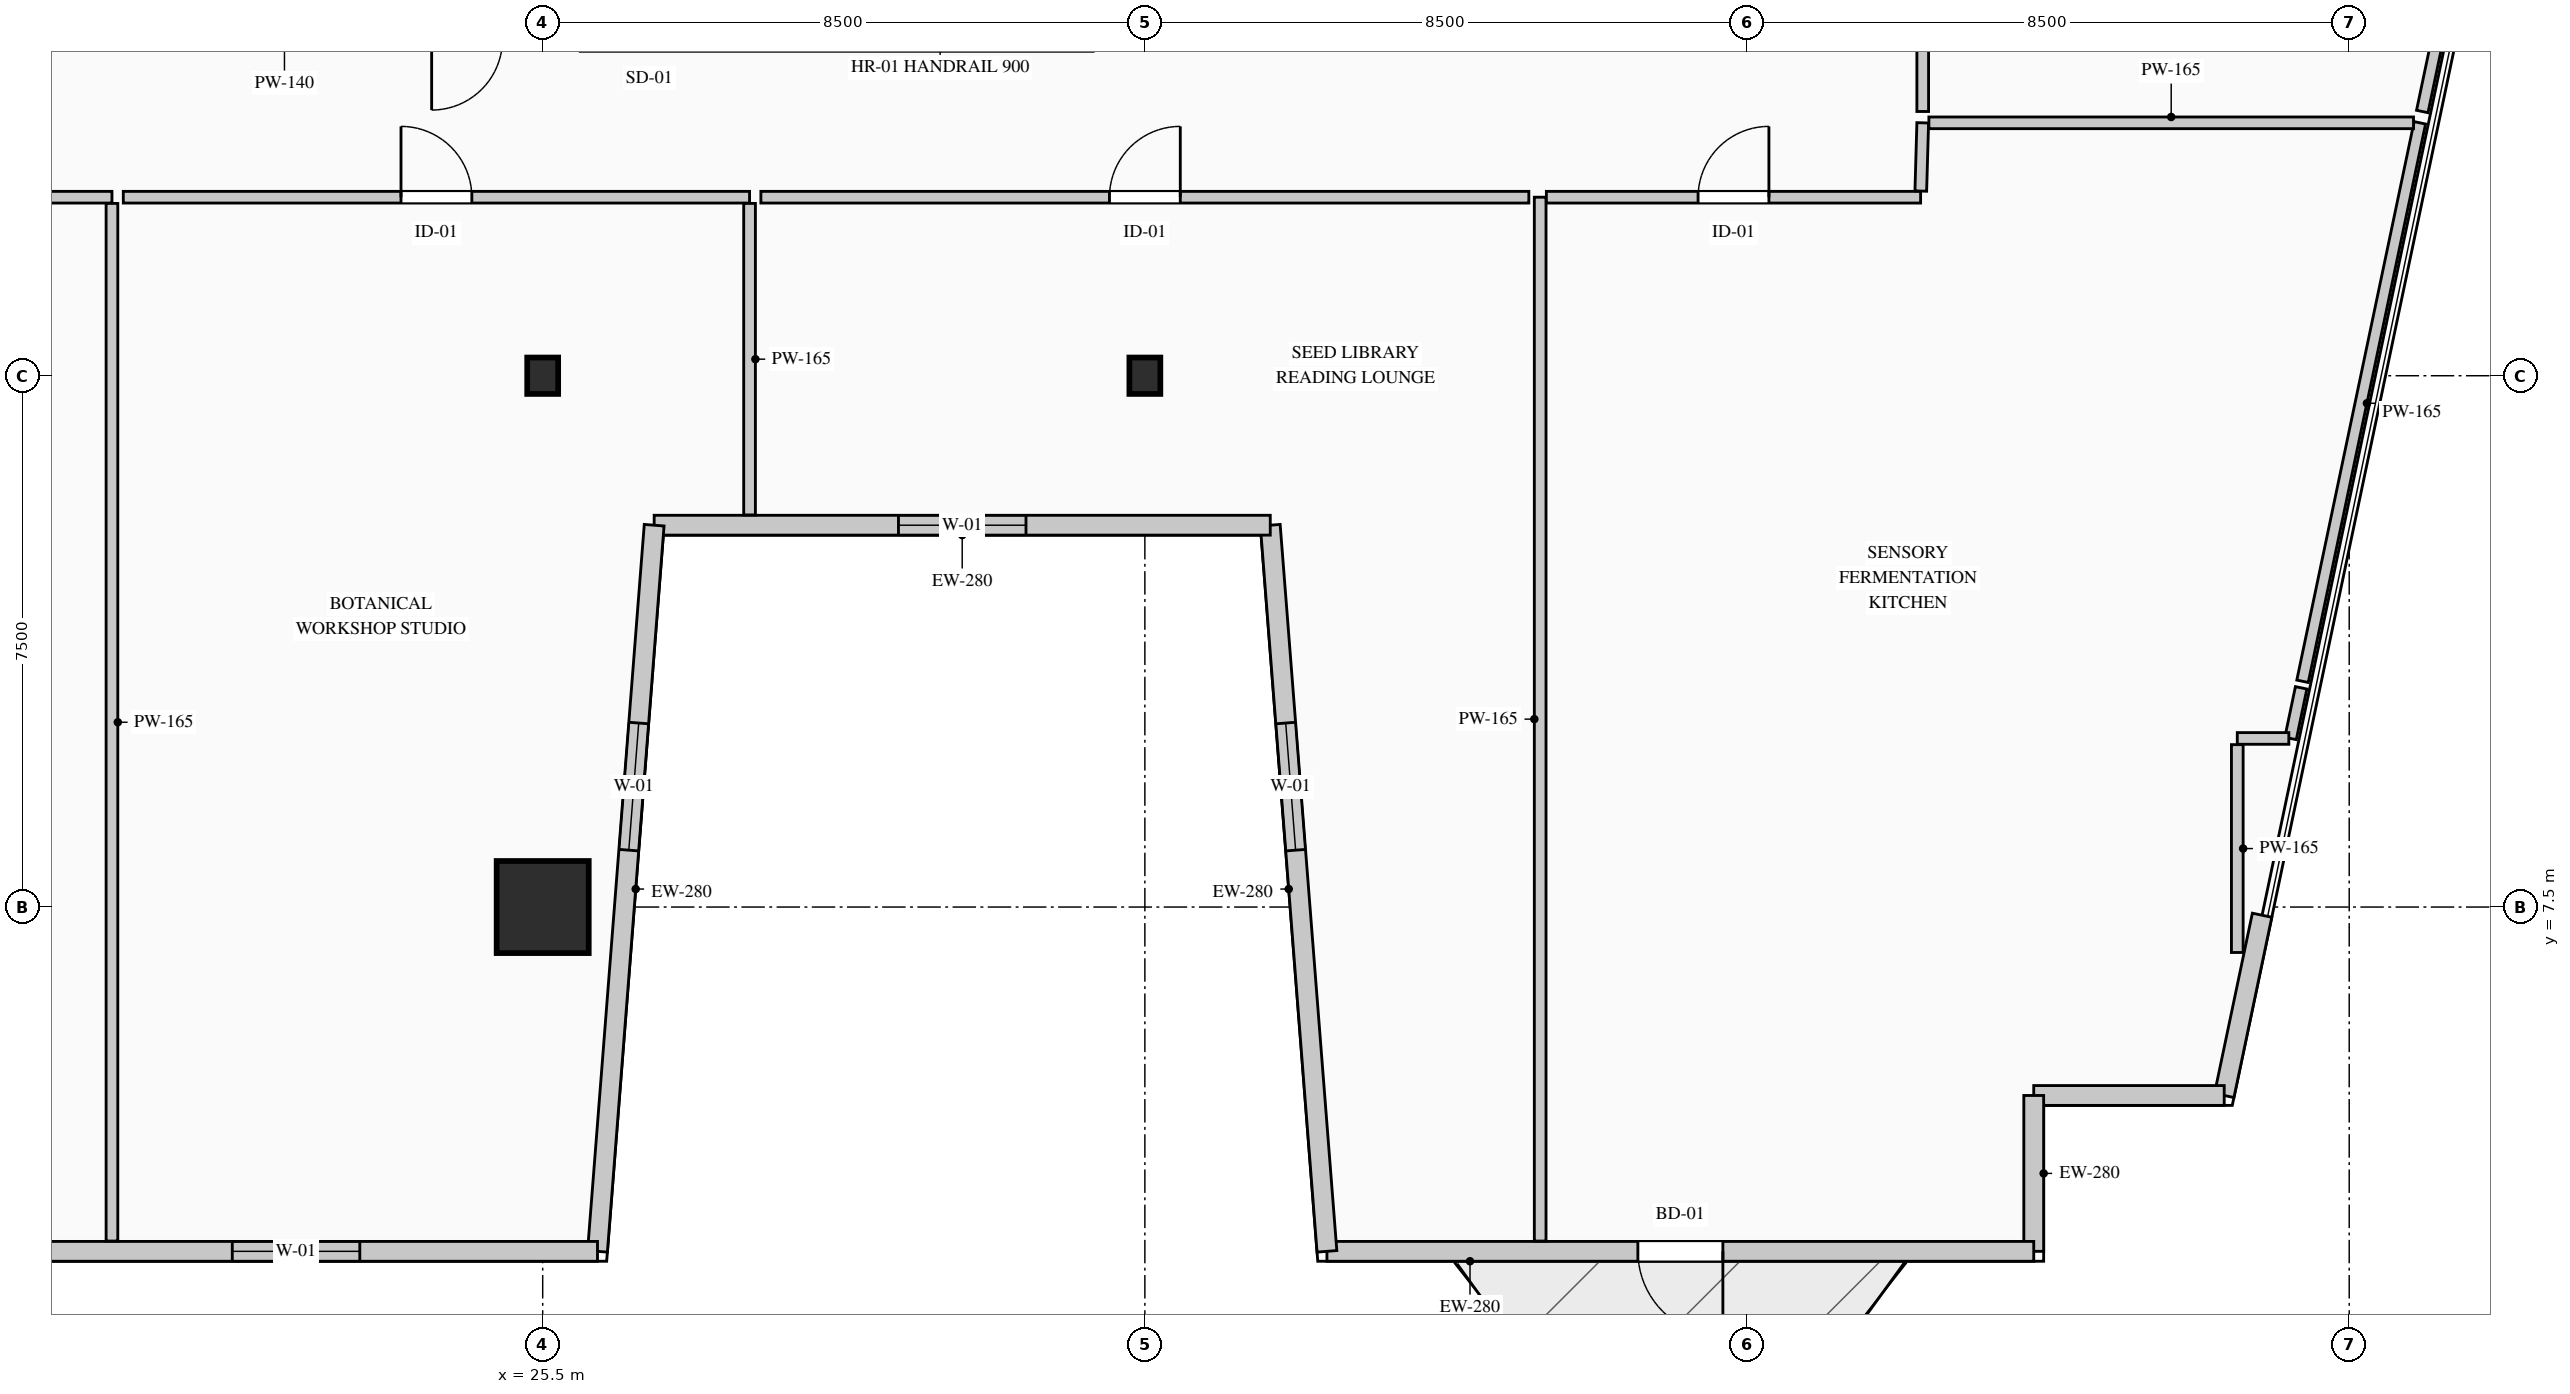
"""IFC4 building model, lengths in metres.
Left out: names, types, materials, properties, quantities, classifications, styles, units other than length and angle.
Written with IfcOpenShell. Run it as: python <this file> out.ifc"""

import sys

from ifc_helpers import new_model, si_unit, direction, frame, frame_2d, origin, origin_2d, place, context, subcontext, project, spatial, rectangle, i_section, extrude, element, fill, save


model = new_model("IFC4")
c1 = context("Model", 3, precision=1e-05, world=origin(), true_north=direction((0.0, 1.0)))
c2 = subcontext(c1, "Body", "Model", "MODEL_VIEW")
j1 = project(units=[si_unit("LENGTHUNIT", "METRE"), si_unit("PLANEANGLEUNIT", "RADIAN")], contexts=[c1])
p1 = place(None, origin())
s1 = spatial("IfcSite", under=j1, at=p1, CompositionType="ELEMENT")
p2 = place(p1, origin())
s2 = spatial("IfcBuilding", under=s1, at=p2, CompositionType="ELEMENT")
p3 = place(p2, frame((0.0, 0.0, 88.6)))
s3 = spatial("IfcBuildingStorey", under=s2, at=p3, CompositionType="ELEMENT", Elevation=88.6)
p4 = place(p3, frame((25.5, 7.5, 0.0), z_axis=(0.0, 0.0, 1.0), x_axis=(1.0, 0.0, 0.0)))
e1 = element("IfcColumn", 1, at=p4, inside=s3, PredefinedType="COLUMN", context=c2, shape_type="SweptSolid", body=[
    extrude(rectangle(XDim=1.3, YDim=1.3, at=origin_2d()), origin(), (0.0, 0.0, 1.0), 4.4),
])
for number, where, z_axis, x_axis in (
    (2, (25.5, 15.0, 0.0), (0.0, 0.0, 1.0), (1.0, 0.0, 0.0)),
    (3, (34.0, 15.0, 0.0), (0.0, 0.0, 1.0), (1.0, 0.0, 0.0)),
):
    element("IfcColumn", number, at=place(p3, frame(where, z_axis=z_axis, x_axis=x_axis)), inside=s3, PredefinedType="COLUMN", context=c2, shape_type="SweptSolid", body=[
        extrude(i_section(OverallWidth=0.437, OverallDepth=0.514, WebThickness=0.061, FlangeThickness=0.077, FilletRadius=0.015, at=origin_2d()), origin(), (0.0, 0.0, 1.0), 4.4),
    ])
p5 = place(p3, frame((49.77, 7.385, 0.0), z_axis=(0.0, 0.0, 1.0), x_axis=(-0.205551409765, -0.978646319128, 0.0)))
e4 = element("IfcWall", 4, at=p5, inside=s3, PredefinedType="STANDARD", context=c2, shape_type="SweptSolid", body=[
    extrude(rectangle(XDim=2.6, YDim=0.28, at=frame_2d((1.3, 0.0))), origin(), (0.0, 0.0, 1.0), 4.115),
])
p6 = place(p3, frame((49.236, 4.84, 0.0), z_axis=(0.0, 0.0, 1.0), x_axis=(-1.0, 0.0, 0.0)))
e5 = element("IfcWall", 5, at=p6, inside=s3, PredefinedType="STANDARD", context=c2, shape_type="SweptSolid", body=[
    extrude(rectangle(XDim=2.688, YDim=0.28, at=frame_2d((1.344, 0.0))), origin(), (0.0, 0.0, 1.0), 4.115),
])
p7 = place(p3, frame((46.547, 4.84, 0.0), z_axis=(0.0, 0.0, 1.0), x_axis=(0.0, -1.0, 0.0)))
e6 = element("IfcWall", 6, at=p7, inside=s3, PredefinedType="STANDARD", context=c2, shape_type="SweptSolid", body=[
    extrude(rectangle(XDim=2.2, YDim=0.28, at=frame_2d((1.1, 0.0))), origin(), (0.0, 0.0, 1.0), 4.115),
])
p8 = place(p3, frame((46.547, 2.64, 0.0), z_axis=(0.0, 0.0, 1.0), x_axis=(-1.0, 0.0, 0.0)))
e7 = element("IfcWall", 7, at=p8, inside=s3, PredefinedType="STANDARD", context=c2, shape_type="SweptSolid", body=[
    extrude(rectangle(XDim=9.977, YDim=0.28, at=frame_2d((4.989, 0.0))), origin(), (0.0, 0.0, 1.0), 4.115),
])
p9 = place(p8, frame((4.388, 0.0, 0.0)))
e8 = element("IfcOpeningElement", 8, at=p9, cuts=e7, PredefinedType="OPENING", context=c2, shape_type="SweptSolid", body=[
    extrude(rectangle(XDim=1.2, YDim=2.2, at=frame_2d((0.6, 1.1))), frame((0.0, 0.15, 0.0), z_axis=(0.0, -1.0, 0.0), x_axis=(1.0, 0.0, 0.0)), (0.0, 0.0, 1.0), 0.3),
])
p10 = place(p3, frame((36.57, 2.64, 0.0), z_axis=(0.0, 0.0, 1.0), x_axis=(-0.077816860153, 0.996967670627, 0.0)))
e9 = element("IfcWall", 9, at=p10, inside=s3, PredefinedType="STANDARD", context=c2, shape_type="SweptSolid", body=[
    extrude(rectangle(XDim=10.281, YDim=0.28, at=frame_2d((5.141, 0.0))), origin(), (0.0, 0.0, 1.0), 4.115),
])
p11 = place(p10, frame((5.68, 0.0, 0.9)))
e10 = element("IfcOpeningElement", 10, at=p11, cuts=e9, PredefinedType="OPENING", context=c2, shape_type="SweptSolid", body=[
    extrude(rectangle(XDim=1.8, YDim=2.1, at=frame_2d((0.9, 1.05))), frame((0.0, 0.15, 0.0), z_axis=(0.0, -1.0, 0.0), x_axis=(1.0, 0.0, 0.0)), (0.0, 0.0, 1.0), 0.3),
])
p12 = place(p3, frame((35.77, 12.89, 0.0), z_axis=(0.0, 0.0, 1.0), x_axis=(-1.0, 0.0, 0.0)))
e11 = element("IfcWall", 11, at=p12, inside=s3, PredefinedType="STANDARD", context=c2, shape_type="SweptSolid", body=[
    extrude(rectangle(XDim=8.697, YDim=0.28, at=frame_2d((4.348, 0.0))), origin(), (0.0, 0.0, 1.0), 4.115),
])
p13 = place(p12, frame((3.448, 0.0, 0.9)))
e12 = element("IfcOpeningElement", 12, at=p13, cuts=e11, PredefinedType="OPENING", context=c2, shape_type="SweptSolid", body=[
    extrude(rectangle(XDim=1.8, YDim=2.1, at=frame_2d((0.9, 1.05))), frame((0.0, 0.15, 0.0), z_axis=(0.0, -1.0, 0.0), x_axis=(1.0, 0.0, 0.0)), (0.0, 0.0, 1.0), 0.3),
])
p14 = place(p3, frame((27.073, 12.89, 0.0), z_axis=(0.0, 0.0, 1.0), x_axis=(-0.077816860153, -0.996967670627, 0.0)))
e13 = element("IfcWall", 13, at=p14, inside=s3, PredefinedType="STANDARD", context=c2, shape_type="SweptSolid", body=[
    extrude(rectangle(XDim=10.281, YDim=0.28, at=frame_2d((5.141, 0.0))), origin(), (0.0, 0.0, 1.0), 4.115),
])
p15 = place(p14, frame((2.801, 0.0, 0.9)))
e14 = element("IfcOpeningElement", 14, at=p15, cuts=e13, PredefinedType="OPENING", context=c2, shape_type="SweptSolid", body=[
    extrude(rectangle(XDim=1.8, YDim=2.1, at=frame_2d((0.9, 1.05))), frame((0.0, 0.15, 0.0), z_axis=(0.0, -1.0, 0.0), x_axis=(1.0, 0.0, 0.0)), (0.0, 0.0, 1.0), 0.3),
])
p16 = place(p3, frame((26.273, 2.64, 0.0), z_axis=(0.0, 0.0, 1.0), x_axis=(-1.0, 0.0, 0.0)))
e15 = element("IfcWall", 15, at=p16, inside=s3, PredefinedType="STANDARD", context=c2, shape_type="SweptSolid", body=[
    extrude(rectangle(XDim=15.197, YDim=0.28, at=frame_2d((7.598, 0.0))), origin(), (0.0, 0.0, 1.0), 4.115),
])
p17 = place(p16, frame((3.355, 0.0, 0.9)))
e16 = element("IfcOpeningElement", 16, at=p17, cuts=e15, PredefinedType="OPENING", context=c2, shape_type="SweptSolid", body=[
    extrude(rectangle(XDim=1.8, YDim=2.1, at=frame_2d((0.9, 1.05))), frame((0.0, 0.15, 0.0), z_axis=(0.0, -1.0, 0.0), x_axis=(1.0, 0.0, 0.0)), (0.0, 0.0, 1.0), 0.3),
])
p18 = place(p3, frame((10.667, 17.52, 0.0), z_axis=(0.0, 0.0, 1.0), x_axis=(1.0, 0.0, 0.0)))
e17 = element("IfcWall", 17, at=p18, inside=s3, PredefinedType="PARTITIONING", context=c2, shape_type="SweptSolid", body=[
    extrude(rectangle(XDim=8.752, YDim=0.165, at=frame_2d((4.376, 0.0))), origin(), (0.0, 0.0, 1.0), 4.115),
])
p19 = place(p18, frame((3.876, 0.0, 0.0)))
e18 = element("IfcOpeningElement", 18, at=p19, cuts=e17, PredefinedType="OPENING", context=c2, shape_type="SweptSolid", body=[
    extrude(rectangle(XDim=1.0, YDim=2.15, at=frame_2d((0.5, 1.075))), frame((0.0, 0.093, 0.0), z_axis=(0.0, -1.0, 0.0), x_axis=(1.0, 0.0, 0.0)), (0.0, 0.0, 1.0), 0.185),
])
p20 = place(p3, frame((19.42, 17.433, 0.0), z_axis=(0.0, 0.0, 1.0), x_axis=(0.0, -1.0, 0.0)))
e19 = element("IfcWall", 19, at=p20, inside=s3, PredefinedType="PARTITIONING", context=c2, shape_type="SweptSolid", body=[
    extrude(rectangle(XDim=14.648, YDim=0.165, at=frame_2d((7.324, 0.0))), origin(), (0.0, 0.0, 1.0), 3.8),
])
p21 = place(p3, frame((19.58, 17.52, 0.0), z_axis=(0.0, 0.0, 1.0), x_axis=(1.0, 0.0, 0.0)))
e20 = element("IfcWall", 20, at=p21, inside=s3, PredefinedType="PARTITIONING", context=c2, shape_type="SweptSolid", body=[
    extrude(rectangle(XDim=8.84, YDim=0.165, at=frame_2d((4.42, 0.0))), origin(), (0.0, 0.0, 1.0), 3.8),
])
p22 = place(p21, frame((3.92, 0.0, 0.0)))
e21 = element("IfcOpeningElement", 21, at=p22, cuts=e20, PredefinedType="OPENING", context=c2, shape_type="SweptSolid", body=[
    extrude(rectangle(XDim=1.0, YDim=2.15, at=frame_2d((0.5, 1.075))), frame((0.0, 0.093, 0.0), z_axis=(0.0, -1.0, 0.0), x_axis=(1.0, 0.0, 0.0)), (0.0, 0.0, 1.0), 0.185),
])
p23 = place(p3, frame((28.42, 17.433, 0.0), z_axis=(0.0, 0.0, 1.0), x_axis=(0.0, -1.0, 0.0)))
e22 = element("IfcWall", 22, at=p23, inside=s3, PredefinedType="PARTITIONING", context=c2, shape_type="SweptSolid", body=[
    extrude(rectangle(XDim=4.398, YDim=0.165, at=frame_2d((2.199, 0.0))), origin(), (0.0, 0.0, 1.0), 4.115),
])
p24 = place(p3, frame((51.997, 18.57, 0.0), z_axis=(0.0, 0.0, 1.0), x_axis=(-0.205584289858, -0.978639412533, 0.0)))
e23 = element("IfcWall", 23, at=p24, inside=s3, PredefinedType="PARTITIONING", context=c2, shape_type="SweptSolid", body=[
    extrude(rectangle(XDim=8.055, YDim=0.165, at=frame_2d((4.028, 0.0))), origin(), (0.0, 0.0, 1.0), 4.115),
])
p25 = place(p3, frame((50.322, 10.594, 0.0), z_axis=(0.0, 0.0, 1.0), x_axis=(-0.204661980979, -0.978832709681, 0.0)))
e24 = element("IfcWall", 24, at=p25, inside=s3, PredefinedType="PARTITIONING", context=c2, shape_type="SweptSolid", body=[
    extrude(rectangle(XDim=0.73, YDim=0.165, at=frame_2d((0.365, 0.0))), origin(), (0.0, 0.0, 1.0), 4.115),
])
p26 = place(p3, frame((50.148, 9.88, 0.0), z_axis=(0.0, 0.0, 1.0), x_axis=(-1.0, 0.0, 0.0)))
e25 = element("IfcWall", 25, at=p26, inside=s3, PredefinedType="PARTITIONING", context=c2, shape_type="SweptSolid", body=[
    extrude(rectangle(XDim=0.728, YDim=0.165, at=frame_2d((0.364, 0.0))), origin(), (0.0, 0.0, 1.0), 4.115),
])
p27 = place(p3, frame((49.42, 9.792, 0.0), z_axis=(0.0, 0.0, 1.0), x_axis=(0.0, -1.0, 0.0)))
e26 = element("IfcWall", 26, at=p27, inside=s3, PredefinedType="PARTITIONING", context=c2, shape_type="SweptSolid", body=[
    extrude(rectangle(XDim=2.934, YDim=0.165, at=frame_2d((1.467, 0.0))), origin(), (0.0, 0.0, 1.0), 4.115),
])
p28 = place(p3, frame((39.58, 2.785, 0.0), z_axis=(0.0, 0.0, 1.0), x_axis=(0.0, 1.0, 0.0)))
e27 = element("IfcWall", 27, at=p28, inside=s3, PredefinedType="PARTITIONING", context=c2, shape_type="SweptSolid", body=[
    extrude(rectangle(XDim=14.735, YDim=0.165, at=frame_2d((7.368, 0.0))), origin(), (0.0, 0.0, 1.0), 4.115),
])
p29 = place(p3, frame((39.667, 17.52, 0.0), z_axis=(0.0, 0.0, 1.0), x_axis=(1.0, 0.0, 0.0)))
e28 = element("IfcWall", 28, at=p29, inside=s3, PredefinedType="PARTITIONING", context=c2, shape_type="SweptSolid", body=[
    extrude(rectangle(XDim=5.282, YDim=0.165, at=frame_2d((2.641, 0.0))), origin(), (0.0, 0.0, 1.0), 4.115),
])
p30 = place(p29, frame((2.141, 0.0, 0.0)))
e29 = element("IfcOpeningElement", 29, at=p30, cuts=e28, PredefinedType="OPENING", context=c2, shape_type="SweptSolid", body=[
    extrude(rectangle(XDim=1.0, YDim=2.15, at=frame_2d((0.5, 1.075))), frame((0.0, 0.093, 0.0), z_axis=(0.0, -1.0, 0.0), x_axis=(1.0, 0.0, 0.0)), (0.0, 0.0, 1.0), 0.185),
])
p31 = place(p3, frame((44.952, 17.607, 0.0), z_axis=(0.0, 0.0, 1.0), x_axis=(0.028624859452, 0.999590224753, 0.0)))
e30 = element("IfcWall", 30, at=p31, inside=s3, PredefinedType="PARTITIONING", context=c2, shape_type="SweptSolid", body=[
    extrude(rectangle(XDim=0.964, YDim=0.165, at=frame_2d((0.482, 0.0))), origin(), (0.0, 0.0, 1.0), 4.115),
])
p32 = place(p3, frame((45.067, 18.57, 0.0), z_axis=(0.0, 0.0, 1.0), x_axis=(1.0, 0.0, 0.0)))
e31 = element("IfcWall", 31, at=p32, inside=s3, PredefinedType="PARTITIONING", context=c2, shape_type="SweptSolid", body=[
    extrude(rectangle(XDim=6.841, YDim=0.165, at=frame_2d((3.42, 0.0))), origin(), (0.0, 0.0, 1.0), 4.115),
])
p33 = place(p3, frame((28.58, 17.52, 0.0), z_axis=(0.0, 0.0, 1.0), x_axis=(1.0, 0.0, 0.0)))
e32 = element("IfcWall", 32, at=p33, inside=s3, PredefinedType="PARTITIONING", context=c2, shape_type="SweptSolid", body=[
    extrude(rectangle(XDim=10.84, YDim=0.165, at=frame_2d((5.42, 0.0))), origin(), (0.0, 0.0, 1.0), 3.8),
])
p34 = place(p33, frame((4.92, 0.0, 0.0)))
e33 = element("IfcOpeningElement", 33, at=p34, cuts=e32, PredefinedType="OPENING", context=c2, shape_type="SweptSolid", body=[
    extrude(rectangle(XDim=1.0, YDim=2.15, at=frame_2d((0.5, 1.075))), frame((0.0, 0.093, 0.0), z_axis=(0.0, -1.0, 0.0), x_axis=(1.0, 0.0, 0.0)), (0.0, 0.0, 1.0), 0.185),
])
p35 = place(p3, frame((44.98, 18.73, 0.0), z_axis=(0.0, 0.0, 1.0), x_axis=(0.0, 1.0, 0.0)))
e34 = element("IfcWall", 34, at=p35, inside=s3, PredefinedType="PARTITIONING", context=c2, shape_type="SweptSolid", body=[
    extrude(rectangle(XDim=6.69, YDim=0.165, at=frame_2d((3.345, 0.0))), origin(), (0.0, 0.0, 1.0), 4.115),
])
p36 = place(p35, frame((2.845, 0.0, 0.0)))
e35 = element("IfcOpeningElement", 35, at=p36, cuts=e34, PredefinedType="OPENING", context=c2, shape_type="SweptSolid", body=[
    extrude(rectangle(XDim=1.0, YDim=2.15, at=frame_2d((0.5, 1.075))), frame((0.0, 0.093, 0.0), z_axis=(0.0, -1.0, 0.0), x_axis=(1.0, 0.0, 0.0)), (0.0, 0.0, 1.0), 0.185),
])
p37 = place(p3, frame((53.417, 25.333, 0.0), z_axis=(0.0, 0.0, 1.0), x_axis=(-0.205508916106, -0.978655243383, 0.0)))
e36 = element("IfcWall", 36, at=p37, inside=s3, PredefinedType="PARTITIONING", context=c2, shape_type="SweptSolid", body=[
    extrude(rectangle(XDim=6.747, YDim=0.165, at=frame_2d((3.373, 0.0))), origin(), (0.0, 0.0, 1.0), 4.115),
])
p38 = place(p9, origin())
e37 = element("IfcDoor", 37, at=p38, inside=s3, OperationType="SINGLE_SWING_LEFT", PredefinedType="DOOR", context=c2, shape_type="SweptSolid", body=[
    extrude(rectangle(XDim=1.2, YDim=2.2, at=frame_2d((0.6, 1.1))), frame((0.0, 0.025, 0.0), z_axis=(0.0, -1.0, 0.0), x_axis=(1.0, 0.0, 0.0)), (0.0, 0.0, 1.0), 0.05),
])
fill(e8, e37)
p39 = place(p11, origin())
e38 = element("IfcWindow", 38, at=p39, inside=s3, PartitioningType="SINGLE_PANEL", PredefinedType="WINDOW", context=c2, shape_type="SweptSolid", body=[
    extrude(rectangle(XDim=1.8, YDim=2.1, at=frame_2d((0.9, 1.05))), frame((0.0, 0.03, 0.0), z_axis=(0.0, -1.0, 0.0), x_axis=(1.0, 0.0, 0.0)), (0.0, 0.0, 1.0), 0.06),
])
fill(e10, e38)
p40 = place(p13, origin())
e39 = element("IfcWindow", 39, at=p40, inside=s3, PartitioningType="SINGLE_PANEL", PredefinedType="WINDOW", context=c2, shape_type="SweptSolid", body=[
    extrude(rectangle(XDim=1.8, YDim=2.1, at=frame_2d((0.9, 1.05))), frame((0.0, 0.03, 0.0), z_axis=(0.0, -1.0, 0.0), x_axis=(1.0, 0.0, 0.0)), (0.0, 0.0, 1.0), 0.06),
])
fill(e12, e39)
p41 = place(p15, origin())
e40 = element("IfcWindow", 40, at=p41, inside=s3, PartitioningType="SINGLE_PANEL", PredefinedType="WINDOW", context=c2, shape_type="SweptSolid", body=[
    extrude(rectangle(XDim=1.8, YDim=2.1, at=frame_2d((0.9, 1.05))), frame((0.0, 0.03, 0.0), z_axis=(0.0, -1.0, 0.0), x_axis=(1.0, 0.0, 0.0)), (0.0, 0.0, 1.0), 0.06),
])
fill(e14, e40)
p42 = place(p17, origin())
e41 = element("IfcWindow", 41, at=p42, inside=s3, PartitioningType="SINGLE_PANEL", PredefinedType="WINDOW", context=c2, shape_type="SweptSolid", body=[
    extrude(rectangle(XDim=1.8, YDim=2.1, at=frame_2d((0.9, 1.05))), frame((0.0, 0.03, 0.0), z_axis=(0.0, -1.0, 0.0), x_axis=(1.0, 0.0, 0.0)), (0.0, 0.0, 1.0), 0.06),
])
fill(e16, e41)
p43 = place(p22, origin())
e42 = element("IfcDoor", 42, at=p43, inside=s3, OperationType="SINGLE_SWING_LEFT", PredefinedType="DOOR", context=c2, shape_type="SweptSolid", body=[
    extrude(rectangle(XDim=1.0, YDim=2.15, at=frame_2d((0.5, 1.075))), frame((0.0, 0.025, 0.0), z_axis=(0.0, -1.0, 0.0), x_axis=(1.0, 0.0, 0.0)), (0.0, 0.0, 1.0), 0.05),
])
fill(e21, e42)
p44 = place(p30, origin())
e43 = element("IfcDoor", 43, at=p44, inside=s3, OperationType="SINGLE_SWING_RIGHT", PredefinedType="DOOR", context=c2, shape_type="SweptSolid", body=[
    extrude(rectangle(XDim=1.0, YDim=2.15, at=frame_2d((0.5, 1.075))), frame((0.0, 0.025, 0.0), z_axis=(0.0, -1.0, 0.0), x_axis=(1.0, 0.0, 0.0)), (0.0, 0.0, 1.0), 0.05),
])
fill(e29, e43)
p45 = place(p34, origin())
e44 = element("IfcDoor", 44, at=p45, inside=s3, OperationType="SINGLE_SWING_RIGHT", PredefinedType="DOOR", context=c2, shape_type="SweptSolid", body=[
    extrude(rectangle(XDim=1.0, YDim=2.15, at=frame_2d((0.5, 1.075))), frame((0.0, 0.025, 0.0), z_axis=(0.0, -1.0, 0.0), x_axis=(1.0, 0.0, 0.0)), (0.0, 0.0, 1.0), 0.05),
])
fill(e33, e44)
save(model, sys.argv[1])
